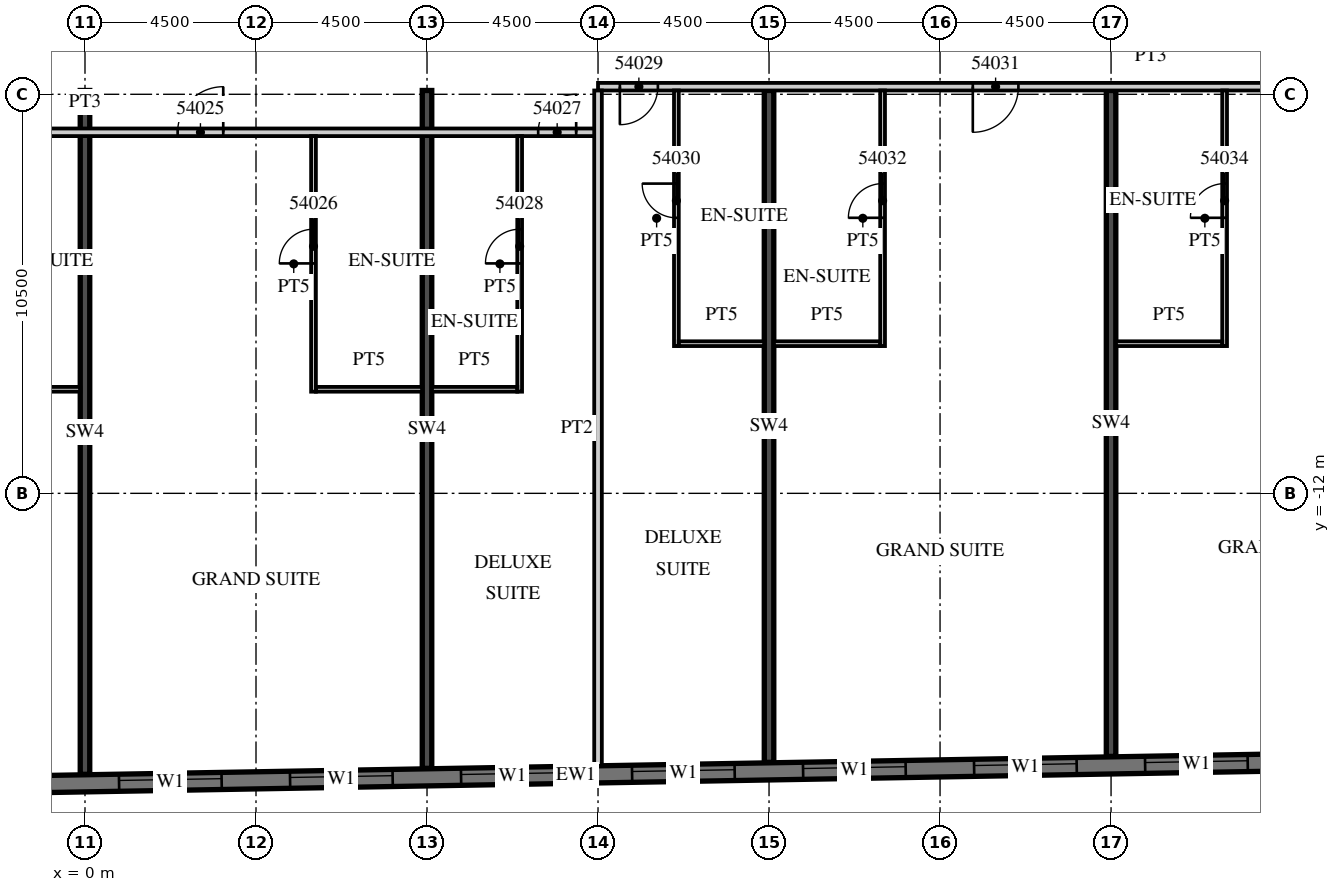
"""IFC4 building model, lengths in metres.
Left out: names, types, materials, properties, quantities, classifications, styles, units other than length and angle.
Written with IfcOpenShell. Run it as: python <this file> out.ifc"""

import sys

from ifc_helpers import new_model, si_unit, direction, frame, frame_2d, origin, place, context, subcontext, project, spatial, rectangle, extrude, element, fill, save


model = new_model("IFC4")
c1 = context("Model", 3, precision=1e-05, world=origin(), true_north=direction((0.0, 1.0)))
c2 = subcontext(c1, "Body", "Model", "MODEL_VIEW")
j1 = project(units=[si_unit("LENGTHUNIT", "METRE"), si_unit("PLANEANGLEUNIT", "RADIAN")], contexts=[c1])
p1 = place(None, origin())
s1 = spatial("IfcSite", under=j1, at=p1, CompositionType="ELEMENT")
p2 = place(p1, origin())
s2 = spatial("IfcBuilding", under=s1, at=p2, CompositionType="ELEMENT")
p3 = place(p2, frame((0.0, 0.0, 224.3)))
s3 = spatial("IfcBuildingStorey", under=s2, at=p3, CompositionType="ELEMENT", Elevation=224.3)
p4 = place(p3, frame((0.0, -19.393, 0.0), z_axis=(0.0, 0.0, 1.0), x_axis=(0.0, 1.0, 0.0)))
e1 = element("IfcWall", 1, at=p4, inside=s3, PredefinedType="SHEAR", context=c2, shape_type="SweptSolid", body=[
    extrude(rectangle(XDim=17.993, YDim=0.25, at=frame_2d((8.997, 0.0))), origin(), (0.0, 0.0, 1.0), 3.3),
])
p5 = place(p3, frame((9.0, -19.236, 0.0), z_axis=(0.0, 0.0, 1.0), x_axis=(0.0, 1.0, 0.0)))
e2 = element("IfcWall", 2, at=p5, inside=s3, PredefinedType="SHEAR", context=c2, shape_type="SweptSolid", body=[
    extrude(rectangle(XDim=17.836, YDim=0.25, at=frame_2d((8.918, 0.0))), origin(), (0.0, 0.0, 1.0), 3.3),
])
p6 = place(p3, frame((18.0, -19.079, 0.0), z_axis=(0.0, 0.0, 1.0), x_axis=(0.0, 1.0, 0.0)))
e3 = element("IfcWall", 3, at=p6, inside=s3, PredefinedType="SHEAR", context=c2, shape_type="SweptSolid", body=[
    extrude(rectangle(XDim=17.679, YDim=0.25, at=frame_2d((8.84, 0.0))), origin(), (0.0, 0.0, 1.0), 3.3),
])
p7 = place(p3, frame((27.0, -18.922, 0.0), z_axis=(0.0, 0.0, 1.0), x_axis=(0.0, 1.0, 0.0)))
e4 = element("IfcWall", 4, at=p7, inside=s3, PredefinedType="SHEAR", context=c2, shape_type="SweptSolid", body=[
    extrude(rectangle(XDim=17.522, YDim=0.25, at=frame_2d((8.761, 0.0))), origin(), (0.0, 0.0, 1.0), 3.3),
])
p8 = place(p3, frame((-13.504, -19.866, 0.0), z_axis=(0.0, 0.0, 1.0), x_axis=(0.999847672978, 0.017453676992, 0.0)))
e5 = element("IfcWall", 5, at=p8, inside=s3, PredefinedType="SOLIDWALL", context=c2, shape_type="SweptSolid", body=[
    extrude(rectangle(XDim=52.86, YDim=0.45, at=frame_2d((26.43, 0.0))), origin(), (0.0, 0.0, 1.0), 3.02),
])
p9 = place(p8, frame((0.9, 0.0, 0.45)))
e6 = element("IfcOpeningElement", 6, at=p9, cuts=e5, PredefinedType="OPENING", context=c2, shape_type="SweptSolid", body=[
    extrude(rectangle(XDim=2.7, YDim=2.25, at=frame_2d((1.35, 1.125))), frame((0.0, 0.235, 0.0), z_axis=(0.0, -1.0, 0.0), x_axis=(1.0, 0.0, 0.0)), (0.0, 0.0, 1.0), 0.47),
])
p10 = place(p8, frame((5.401, 0.0, 0.45)))
e7 = element("IfcOpeningElement", 7, at=p10, cuts=e5, PredefinedType="OPENING", context=c2, shape_type="SweptSolid", body=[
    extrude(rectangle(XDim=2.7, YDim=2.25, at=frame_2d((1.35, 1.125))), frame((0.0, 0.235, 0.0), z_axis=(0.0, -1.0, 0.0), x_axis=(1.0, 0.0, 0.0)), (0.0, 0.0, 1.0), 0.47),
])
p11 = place(p8, frame((9.902, 0.0, 0.45)))
e8 = element("IfcOpeningElement", 8, at=p11, cuts=e5, PredefinedType="OPENING", context=c2, shape_type="SweptSolid", body=[
    extrude(rectangle(XDim=2.7, YDim=2.25, at=frame_2d((1.35, 1.125))), frame((0.0, 0.235, 0.0), z_axis=(0.0, -1.0, 0.0), x_axis=(1.0, 0.0, 0.0)), (0.0, 0.0, 1.0), 0.47),
])
p12 = place(p8, frame((14.402, 0.0, 0.45)))
e9 = element("IfcOpeningElement", 9, at=p12, cuts=e5, PredefinedType="OPENING", context=c2, shape_type="SweptSolid", body=[
    extrude(rectangle(XDim=2.7, YDim=2.25, at=frame_2d((1.35, 1.125))), frame((0.0, 0.235, 0.0), z_axis=(0.0, -1.0, 0.0), x_axis=(1.0, 0.0, 0.0)), (0.0, 0.0, 1.0), 0.47),
])
p13 = place(p8, frame((18.903, 0.0, 0.45)))
e10 = element("IfcOpeningElement", 10, at=p13, cuts=e5, PredefinedType="OPENING", context=c2, shape_type="SweptSolid", body=[
    extrude(rectangle(XDim=2.7, YDim=2.25, at=frame_2d((1.35, 1.125))), frame((0.0, 0.235, 0.0), z_axis=(0.0, -1.0, 0.0), x_axis=(1.0, 0.0, 0.0)), (0.0, 0.0, 1.0), 0.47),
])
p14 = place(p8, frame((23.404, 0.0, 0.45)))
e11 = element("IfcOpeningElement", 11, at=p14, cuts=e5, PredefinedType="OPENING", context=c2, shape_type="SweptSolid", body=[
    extrude(rectangle(XDim=2.7, YDim=2.25, at=frame_2d((1.35, 1.125))), frame((0.0, 0.235, 0.0), z_axis=(0.0, -1.0, 0.0), x_axis=(1.0, 0.0, 0.0)), (0.0, 0.0, 1.0), 0.47),
])
p15 = place(p8, frame((27.904, 0.0, 0.45)))
e12 = element("IfcOpeningElement", 12, at=p15, cuts=e5, PredefinedType="OPENING", context=c2, shape_type="SweptSolid", body=[
    extrude(rectangle(XDim=2.7, YDim=2.25, at=frame_2d((1.35, 1.125))), frame((0.0, 0.235, 0.0), z_axis=(0.0, -1.0, 0.0), x_axis=(1.0, 0.0, 0.0)), (0.0, 0.0, 1.0), 0.47),
])
p16 = place(p8, frame((32.405, 0.0, 0.45)))
e13 = element("IfcOpeningElement", 13, at=p16, cuts=e5, PredefinedType="OPENING", context=c2, shape_type="SweptSolid", body=[
    extrude(rectangle(XDim=2.7, YDim=2.25, at=frame_2d((1.35, 1.125))), frame((0.0, 0.235, 0.0), z_axis=(0.0, -1.0, 0.0), x_axis=(1.0, 0.0, 0.0)), (0.0, 0.0, 1.0), 0.47),
])
p17 = place(p8, frame((36.906, 0.0, 0.45)))
e14 = element("IfcOpeningElement", 14, at=p17, cuts=e5, PredefinedType="OPENING", context=c2, shape_type="SweptSolid", body=[
    extrude(rectangle(XDim=2.7, YDim=2.25, at=frame_2d((1.35, 1.125))), frame((0.0, 0.235, 0.0), z_axis=(0.0, -1.0, 0.0), x_axis=(1.0, 0.0, 0.0)), (0.0, 0.0, 1.0), 0.47),
])
p18 = place(p8, frame((41.406, 0.0, 0.45)))
e15 = element("IfcOpeningElement", 15, at=p18, cuts=e5, PredefinedType="OPENING", context=c2, shape_type="SweptSolid", body=[
    extrude(rectangle(XDim=2.7, YDim=2.25, at=frame_2d((1.35, 1.125))), frame((0.0, 0.235, 0.0), z_axis=(0.0, -1.0, 0.0), x_axis=(1.0, 0.0, 0.0)), (0.0, 0.0, 1.0), 0.47),
])
p19 = place(p8, frame((45.907, 0.0, 0.45)))
e16 = element("IfcOpeningElement", 16, at=p19, cuts=e5, PredefinedType="OPENING", context=c2, shape_type="SweptSolid", body=[
    extrude(rectangle(XDim=2.7, YDim=2.25, at=frame_2d((1.35, 1.125))), frame((0.0, 0.235, 0.0), z_axis=(0.0, -1.0, 0.0), x_axis=(1.0, 0.0, 0.0)), (0.0, 0.0, 1.0), 0.47),
])
p20 = place(p3, frame((-13.5, -2.5, 0.0), z_axis=(0.0, 0.0, 1.0), x_axis=(1.0, 0.0, 0.0)))
e17 = element("IfcWall", 17, at=p20, inside=s3, PredefinedType="PARTITIONING", context=c2, shape_type="SweptSolid", body=[
    extrude(rectangle(XDim=27.0, YDim=0.2, at=frame_2d((13.5, 0.0))), origin(), (0.0, 0.0, 1.0), 3.02),
])
p21 = place(p20, frame((0.575, 0.0, 0.0)))
e18 = element("IfcOpeningElement", 18, at=p21, cuts=e17, PredefinedType="OPENING", context=c2, shape_type="SweptSolid", body=[
    extrude(rectangle(XDim=1.0, YDim=2.1, at=frame_2d((0.5, 1.05))), frame((0.0, 0.11, 0.0), z_axis=(0.0, -1.0, 0.0), x_axis=(1.0, 0.0, 0.0)), (0.0, 0.0, 1.0), 0.22),
])
p22 = place(p20, frame((6.938, 0.0, 0.0)))
e19 = element("IfcOpeningElement", 19, at=p22, cuts=e17, PredefinedType="OPENING", context=c2, shape_type="SweptSolid", body=[
    extrude(rectangle(XDim=1.2, YDim=2.1, at=frame_2d((0.6, 1.05))), frame((0.0, 0.11, 0.0), z_axis=(0.0, -1.0, 0.0), x_axis=(1.0, 0.0, 0.0)), (0.0, 0.0, 1.0), 0.22),
])
p23 = place(p20, frame((15.938, 0.0, 0.0)))
e20 = element("IfcOpeningElement", 20, at=p23, cuts=e17, PredefinedType="OPENING", context=c2, shape_type="SweptSolid", body=[
    extrude(rectangle(XDim=1.2, YDim=2.1, at=frame_2d((0.6, 1.05))), frame((0.0, 0.11, 0.0), z_axis=(0.0, -1.0, 0.0), x_axis=(1.0, 0.0, 0.0)), (0.0, 0.0, 1.0), 0.22),
])
p24 = place(p20, frame((25.425, 0.0, 0.0)))
e21 = element("IfcOpeningElement", 21, at=p24, cuts=e17, PredefinedType="OPENING", context=c2, shape_type="SweptSolid", body=[
    extrude(rectangle(XDim=1.0, YDim=2.1, at=frame_2d((0.5, 1.05))), frame((0.0, 0.11, 0.0), z_axis=(0.0, -1.0, 0.0), x_axis=(1.0, 0.0, 0.0)), (0.0, 0.0, 1.0), 0.22),
])
p25 = place(p3, frame((13.5, -1.3, 0.0), z_axis=(0.0, 0.0, 1.0), x_axis=(1.0, 0.0, 0.0)))
e22 = element("IfcWall", 22, at=p25, inside=s3, PredefinedType="PARTITIONING", context=c2, shape_type="SweptSolid", body=[
    extrude(rectangle(XDim=29.091, YDim=0.2, at=frame_2d((14.545, 0.0))), origin(), (0.0, 0.0, 1.0), 3.02),
])
p26 = place(p25, frame((0.575, 0.0, 0.0)))
e23 = element("IfcOpeningElement", 23, at=p26, cuts=e22, PredefinedType="OPENING", context=c2, shape_type="SweptSolid", body=[
    extrude(rectangle(XDim=1.0, YDim=2.1, at=frame_2d((0.5, 1.05))), frame((0.0, 0.11, 0.0), z_axis=(0.0, -1.0, 0.0), x_axis=(1.0, 0.0, 0.0)), (0.0, 0.0, 1.0), 0.22),
])
p27 = place(p25, frame((9.862, 0.0, 0.0)))
e24 = element("IfcOpeningElement", 24, at=p27, cuts=e22, PredefinedType="OPENING", context=c2, shape_type="SweptSolid", body=[
    extrude(rectangle(XDim=1.2, YDim=2.1, at=frame_2d((0.6, 1.05))), frame((0.0, 0.11, 0.0), z_axis=(0.0, -1.0, 0.0), x_axis=(1.0, 0.0, 0.0)), (0.0, 0.0, 1.0), 0.22),
])
p28 = place(p25, frame((18.862, 0.0, 0.0)))
e25 = element("IfcOpeningElement", 25, at=p28, cuts=e22, PredefinedType="OPENING", context=c2, shape_type="SweptSolid", body=[
    extrude(rectangle(XDim=1.2, YDim=2.1, at=frame_2d((0.6, 1.05))), frame((0.0, 0.11, 0.0), z_axis=(0.0, -1.0, 0.0), x_axis=(1.0, 0.0, 0.0)), (0.0, 0.0, 1.0), 0.22),
])
p29 = place(p25, frame((23.075, 0.0, 0.0)))
e26 = element("IfcOpeningElement", 26, at=p29, cuts=e22, PredefinedType="OPENING", context=c2, shape_type="SweptSolid", body=[
    extrude(rectangle(XDim=1.0, YDim=2.1, at=frame_2d((0.5, 1.05))), frame((0.0, 0.11, 0.0), z_axis=(0.0, -1.0, 0.0), x_axis=(1.0, 0.0, 0.0)), (0.0, 0.0, 1.0), 0.22),
])
p30 = place(p25, frame((27.611, 0.0, 0.0)))
e27 = element("IfcOpeningElement", 27, at=p30, cuts=e22, PredefinedType="OPENING", context=c2, shape_type="SweptSolid", body=[
    extrude(rectangle(XDim=1.0, YDim=2.4, at=frame_2d((0.5, 1.2))), frame((0.0, 0.11, 0.0), z_axis=(0.0, -1.0, 0.0), x_axis=(1.0, 0.0, 0.0)), (0.0, 0.0, 1.0), 0.22),
])
p31 = place(p3, frame((-2.925, -9.262, 0.0), z_axis=(0.0, 0.0, 1.0), x_axis=(1.0, 0.0, 0.0)))
e28 = element("IfcWall", 28, at=p31, inside=s3, PredefinedType="PARTITIONING", context=c2, shape_type="SweptSolid", body=[
    extrude(rectangle(XDim=2.8, YDim=0.125, at=frame_2d((1.4, 0.0))), origin(), (0.0, 0.0, 1.0), 3.02),
])
p32 = place(p3, frame((6.013, -9.325, 0.0), z_axis=(0.0, 0.0, 1.0), x_axis=(0.0, 1.0, 0.0)))
e29 = element("IfcWall", 29, at=p32, inside=s3, PredefinedType="PARTITIONING", context=c2, shape_type="SweptSolid", body=[
    extrude(rectangle(XDim=6.725, YDim=0.125, at=frame_2d((3.362, 0.0))), origin(), (0.0, 0.0, 1.0), 3.02),
])
p33 = place(p32, frame((3.375, 0.0, 0.0)))
e30 = element("IfcOpeningElement", 30, at=p33, cuts=e29, PredefinedType="OPENING", context=c2, shape_type="SweptSolid", body=[
    extrude(rectangle(XDim=0.9, YDim=2.1, at=frame_2d((0.45, 1.05))), frame((0.0, 0.073, 0.0), z_axis=(0.0, -1.0, 0.0), x_axis=(1.0, 0.0, 0.0)), (0.0, 0.0, 1.0), 0.145),
])
p34 = place(p3, frame((6.075, -9.262, 0.0), z_axis=(0.0, 0.0, 1.0), x_axis=(1.0, 0.0, 0.0)))
e31 = element("IfcWall", 31, at=p34, inside=s3, PredefinedType="PARTITIONING", context=c2, shape_type="SweptSolid", body=[
    extrude(rectangle(XDim=2.8, YDim=0.125, at=frame_2d((1.4, 0.0))), origin(), (0.0, 0.0, 1.0), 3.02),
])
p35 = place(p3, frame((13.5, -19.17, 0.0), z_axis=(0.0, 0.0, 1.0), x_axis=(0.0, 1.0, 0.0)))
e32 = element("IfcWall", 32, at=p35, inside=s3, PredefinedType="PARTITIONING", context=c2, shape_type="SweptSolid", body=[
    extrude(rectangle(XDim=17.77, YDim=0.2, at=frame_2d((8.885, 0.0))), origin(), (0.0, 0.0, 1.0), 3.02),
])
p36 = place(p3, frame((11.438, -9.325, 0.0), z_axis=(0.0, 0.0, 1.0), x_axis=(0.0, 1.0, 0.0)))
e33 = element("IfcWall", 33, at=p36, inside=s3, PredefinedType="PARTITIONING", context=c2, shape_type="SweptSolid", body=[
    extrude(rectangle(XDim=6.725, YDim=0.125, at=frame_2d((3.362, 0.0))), origin(), (0.0, 0.0, 1.0), 3.02),
])
p37 = place(p36, frame((3.375, 0.0, 0.0)))
e34 = element("IfcOpeningElement", 34, at=p37, cuts=e33, PredefinedType="OPENING", context=c2, shape_type="SweptSolid", body=[
    extrude(rectangle(XDim=0.9, YDim=2.1, at=frame_2d((0.45, 1.05))), frame((0.0, 0.073, 0.0), z_axis=(0.0, -1.0, 0.0), x_axis=(1.0, 0.0, 0.0)), (0.0, 0.0, 1.0), 0.145),
])
p38 = place(p3, frame((9.125, -9.262, 0.0), z_axis=(0.0, 0.0, 1.0), x_axis=(1.0, 0.0, 0.0)))
e35 = element("IfcWall", 35, at=p38, inside=s3, PredefinedType="PARTITIONING", context=c2, shape_type="SweptSolid", body=[
    extrude(rectangle(XDim=2.25, YDim=0.125, at=frame_2d((1.125, 0.0))), origin(), (0.0, 0.0, 1.0), 3.02),
])
p39 = place(p3, frame((15.562, -8.125, 0.0), z_axis=(0.0, 0.0, 1.0), x_axis=(0.0, 1.0, 0.0)))
e36 = element("IfcWall", 36, at=p39, inside=s3, PredefinedType="PARTITIONING", context=c2, shape_type="SweptSolid", body=[
    extrude(rectangle(XDim=6.725, YDim=0.125, at=frame_2d((3.363, 0.0))), origin(), (0.0, 0.0, 1.0), 3.02),
])
p40 = place(p39, frame((3.375, 0.0, 0.0)))
e37 = element("IfcOpeningElement", 37, at=p40, cuts=e36, PredefinedType="OPENING", context=c2, shape_type="SweptSolid", body=[
    extrude(rectangle(XDim=0.9, YDim=2.1, at=frame_2d((0.45, 1.05))), frame((0.0, 0.073, 0.0), z_axis=(0.0, -1.0, 0.0), x_axis=(1.0, 0.0, 0.0)), (0.0, 0.0, 1.0), 0.145),
])
p41 = place(p3, frame((15.625, -8.062, 0.0), z_axis=(0.0, 0.0, 1.0), x_axis=(1.0, 0.0, 0.0)))
e38 = element("IfcWall", 38, at=p41, inside=s3, PredefinedType="PARTITIONING", context=c2, shape_type="SweptSolid", body=[
    extrude(rectangle(XDim=2.25, YDim=0.125, at=frame_2d((1.125, 0.0))), origin(), (0.0, 0.0, 1.0), 3.02),
])
p42 = place(p3, frame((20.988, -8.125, 0.0), z_axis=(0.0, 0.0, 1.0), x_axis=(0.0, 1.0, 0.0)))
e39 = element("IfcWall", 39, at=p42, inside=s3, PredefinedType="PARTITIONING", context=c2, shape_type="SweptSolid", body=[
    extrude(rectangle(XDim=6.725, YDim=0.125, at=frame_2d((3.363, 0.0))), origin(), (0.0, 0.0, 1.0), 3.02),
])
p43 = place(p42, frame((3.375, 0.0, 0.0)))
e40 = element("IfcOpeningElement", 40, at=p43, cuts=e39, PredefinedType="OPENING", context=c2, shape_type="SweptSolid", body=[
    extrude(rectangle(XDim=0.9, YDim=2.1, at=frame_2d((0.45, 1.05))), frame((0.0, 0.073, 0.0), z_axis=(0.0, -1.0, 0.0), x_axis=(1.0, 0.0, 0.0)), (0.0, 0.0, 1.0), 0.145),
])
p44 = place(p3, frame((18.125, -8.062, 0.0), z_axis=(0.0, 0.0, 1.0), x_axis=(1.0, 0.0, 0.0)))
e41 = element("IfcWall", 41, at=p44, inside=s3, PredefinedType="PARTITIONING", context=c2, shape_type="SweptSolid", body=[
    extrude(rectangle(XDim=2.8, YDim=0.125, at=frame_2d((1.4, 0.0))), origin(), (0.0, 0.0, 1.0), 3.02),
])
p45 = place(p3, frame((29.988, -8.125, 0.0), z_axis=(0.0, 0.0, 1.0), x_axis=(0.0, 1.0, 0.0)))
e42 = element("IfcWall", 42, at=p45, inside=s3, PredefinedType="PARTITIONING", context=c2, shape_type="SweptSolid", body=[
    extrude(rectangle(XDim=6.725, YDim=0.125, at=frame_2d((3.363, 0.0))), origin(), (0.0, 0.0, 1.0), 3.02),
])
p46 = place(p45, frame((3.375, 0.0, 0.0)))
e43 = element("IfcOpeningElement", 43, at=p46, cuts=e42, PredefinedType="OPENING", context=c2, shape_type="SweptSolid", body=[
    extrude(rectangle(XDim=0.9, YDim=2.1, at=frame_2d((0.45, 1.05))), frame((0.0, 0.073, 0.0), z_axis=(0.0, -1.0, 0.0), x_axis=(1.0, 0.0, 0.0)), (0.0, 0.0, 1.0), 0.145),
])
p47 = place(p3, frame((27.125, -8.062, 0.0), z_axis=(0.0, 0.0, 1.0), x_axis=(1.0, 0.0, 0.0)))
e44 = element("IfcWall", 44, at=p47, inside=s3, PredefinedType="PARTITIONING", context=c2, shape_type="SweptSolid", body=[
    extrude(rectangle(XDim=2.8, YDim=0.125, at=frame_2d((1.4, 0.0))), origin(), (0.0, 0.0, 1.0), 3.02),
])
p48 = place(p12, origin())
e45 = element("IfcWindow", 45, at=p48, inside=s3, PartitioningType="SINGLE_PANEL", PredefinedType="WINDOW", context=c2, shape_type="SweptSolid", body=[
    extrude(rectangle(XDim=2.7, YDim=2.25, at=frame_2d((1.35, 1.125))), frame((0.0, 0.09, 0.0), z_axis=(0.0, -1.0, 0.0), x_axis=(1.0, 0.0, 0.0)), (0.0, 0.0, 1.0), 0.06),
])
fill(e9, e45)
p49 = place(p13, origin())
e46 = element("IfcWindow", 46, at=p49, inside=s3, PartitioningType="SINGLE_PANEL", PredefinedType="WINDOW", context=c2, shape_type="SweptSolid", body=[
    extrude(rectangle(XDim=2.7, YDim=2.25, at=frame_2d((1.35, 1.125))), frame((0.0, 0.09, 0.0), z_axis=(0.0, -1.0, 0.0), x_axis=(1.0, 0.0, 0.0)), (0.0, 0.0, 1.0), 0.06),
])
fill(e10, e46)
p50 = place(p14, origin())
e47 = element("IfcWindow", 47, at=p50, inside=s3, PartitioningType="SINGLE_PANEL", PredefinedType="WINDOW", context=c2, shape_type="SweptSolid", body=[
    extrude(rectangle(XDim=2.7, YDim=2.25, at=frame_2d((1.35, 1.125))), frame((0.0, 0.09, 0.0), z_axis=(0.0, -1.0, 0.0), x_axis=(1.0, 0.0, 0.0)), (0.0, 0.0, 1.0), 0.06),
])
fill(e11, e47)
p51 = place(p15, origin())
e48 = element("IfcWindow", 48, at=p51, inside=s3, PartitioningType="SINGLE_PANEL", PredefinedType="WINDOW", context=c2, shape_type="SweptSolid", body=[
    extrude(rectangle(XDim=2.7, YDim=2.25, at=frame_2d((1.35, 1.125))), frame((0.0, 0.09, 0.0), z_axis=(0.0, -1.0, 0.0), x_axis=(1.0, 0.0, 0.0)), (0.0, 0.0, 1.0), 0.06),
])
fill(e12, e48)
p52 = place(p16, origin())
e49 = element("IfcWindow", 49, at=p52, inside=s3, PartitioningType="SINGLE_PANEL", PredefinedType="WINDOW", context=c2, shape_type="SweptSolid", body=[
    extrude(rectangle(XDim=2.7, YDim=2.25, at=frame_2d((1.35, 1.125))), frame((0.0, 0.09, 0.0), z_axis=(0.0, -1.0, 0.0), x_axis=(1.0, 0.0, 0.0)), (0.0, 0.0, 1.0), 0.06),
])
fill(e13, e49)
p53 = place(p17, origin())
e50 = element("IfcWindow", 50, at=p53, inside=s3, PartitioningType="SINGLE_PANEL", PredefinedType="WINDOW", context=c2, shape_type="SweptSolid", body=[
    extrude(rectangle(XDim=2.7, YDim=2.25, at=frame_2d((1.35, 1.125))), frame((0.0, 0.09, 0.0), z_axis=(0.0, -1.0, 0.0), x_axis=(1.0, 0.0, 0.0)), (0.0, 0.0, 1.0), 0.06),
])
fill(e14, e50)
p54 = place(p18, origin())
e51 = element("IfcWindow", 51, at=p54, inside=s3, PartitioningType="SINGLE_PANEL", PredefinedType="WINDOW", context=c2, shape_type="SweptSolid", body=[
    extrude(rectangle(XDim=2.7, YDim=2.25, at=frame_2d((1.35, 1.125))), frame((0.0, 0.09, 0.0), z_axis=(0.0, -1.0, 0.0), x_axis=(1.0, 0.0, 0.0)), (0.0, 0.0, 1.0), 0.06),
])
fill(e15, e51)
p55 = place(p23, origin())
e52 = element("IfcDoor", 52, at=p55, inside=s3, OperationType="SINGLE_SWING_RIGHT", PredefinedType="DOOR", context=c2, shape_type="SweptSolid", body=[
    extrude(rectangle(XDim=1.2, YDim=2.1, at=frame_2d((0.6, 1.05))), frame((0.0, 0.025, 0.0), z_axis=(0.0, -1.0, 0.0), x_axis=(1.0, 0.0, 0.0)), (0.0, 0.0, 1.0), 0.05),
])
fill(e20, e52)
p56 = place(p33, origin())
e53 = element("IfcDoor", 53, at=p56, inside=s3, OperationType="SINGLE_SWING_LEFT", PredefinedType="DOOR", context=c2, shape_type="SweptSolid", body=[
    extrude(rectangle(XDim=0.9, YDim=2.1, at=frame_2d((0.45, 1.05))), frame((0.0, 0.025, 0.0), z_axis=(0.0, -1.0, 0.0), x_axis=(1.0, 0.0, 0.0)), (0.0, 0.0, 1.0), 0.05),
])
fill(e30, e53)
p57 = place(p24, origin())
e54 = element("IfcDoor", 54, at=p57, inside=s3, OperationType="SINGLE_SWING_RIGHT", PredefinedType="DOOR", context=c2, shape_type="SweptSolid", body=[
    extrude(rectangle(XDim=1.0, YDim=2.1, at=frame_2d((0.5, 1.05))), frame((0.0, 0.025, 0.0), z_axis=(0.0, -1.0, 0.0), x_axis=(1.0, 0.0, 0.0)), (0.0, 0.0, 1.0), 0.05),
])
fill(e21, e54)
p58 = place(p37, origin())
e55 = element("IfcDoor", 55, at=p58, inside=s3, OperationType="SINGLE_SWING_LEFT", PredefinedType="DOOR", context=c2, shape_type="SweptSolid", body=[
    extrude(rectangle(XDim=0.9, YDim=2.1, at=frame_2d((0.45, 1.05))), frame((0.0, 0.025, 0.0), z_axis=(0.0, -1.0, 0.0), x_axis=(1.0, 0.0, 0.0)), (0.0, 0.0, 1.0), 0.05),
])
fill(e34, e55)
p59 = place(p26, origin())
e56 = element("IfcDoor", 56, at=p59, inside=s3, OperationType="SINGLE_SWING_LEFT", PredefinedType="DOOR", context=c2, shape_type="SweptSolid", body=[
    extrude(rectangle(XDim=1.0, YDim=2.1, at=frame_2d((0.5, 1.05))), frame((0.0, 0.025, 0.0), z_axis=(0.0, -1.0, 0.0), x_axis=(1.0, 0.0, 0.0)), (0.0, 0.0, 1.0), 0.05),
])
fill(e23, e56)
p60 = place(p40, origin())
e57 = element("IfcDoor", 57, at=p60, inside=s3, OperationType="SINGLE_SWING_RIGHT", PredefinedType="DOOR", context=c2, shape_type="SweptSolid", body=[
    extrude(rectangle(XDim=0.9, YDim=2.1, at=frame_2d((0.45, 1.05))), frame((0.0, 0.025, 0.0), z_axis=(0.0, -1.0, 0.0), x_axis=(1.0, 0.0, 0.0)), (0.0, 0.0, 1.0), 0.05),
])
fill(e37, e57)
p61 = place(p27, origin())
e58 = element("IfcDoor", 58, at=p61, inside=s3, OperationType="SINGLE_SWING_LEFT", PredefinedType="DOOR", context=c2, shape_type="SweptSolid", body=[
    extrude(rectangle(XDim=1.2, YDim=2.1, at=frame_2d((0.6, 1.05))), frame((0.0, 0.025, 0.0), z_axis=(0.0, -1.0, 0.0), x_axis=(1.0, 0.0, 0.0)), (0.0, 0.0, 1.0), 0.05),
])
fill(e24, e58)
p62 = place(p43, origin())
e59 = element("IfcDoor", 59, at=p62, inside=s3, OperationType="SINGLE_SWING_LEFT", PredefinedType="DOOR", context=c2, shape_type="SweptSolid", body=[
    extrude(rectangle(XDim=0.9, YDim=2.1, at=frame_2d((0.45, 1.05))), frame((0.0, 0.025, 0.0), z_axis=(0.0, -1.0, 0.0), x_axis=(1.0, 0.0, 0.0)), (0.0, 0.0, 1.0), 0.05),
])
fill(e40, e59)
p63 = place(p46, origin())
e60 = element("IfcDoor", 60, at=p63, inside=s3, OperationType="SINGLE_SWING_LEFT", PredefinedType="DOOR", context=c2, shape_type="SweptSolid", body=[
    extrude(rectangle(XDim=0.9, YDim=2.1, at=frame_2d((0.45, 1.05))), frame((0.0, 0.025, 0.0), z_axis=(0.0, -1.0, 0.0), x_axis=(1.0, 0.0, 0.0)), (0.0, 0.0, 1.0), 0.05),
])
fill(e43, e60)
save(model, sys.argv[1])
